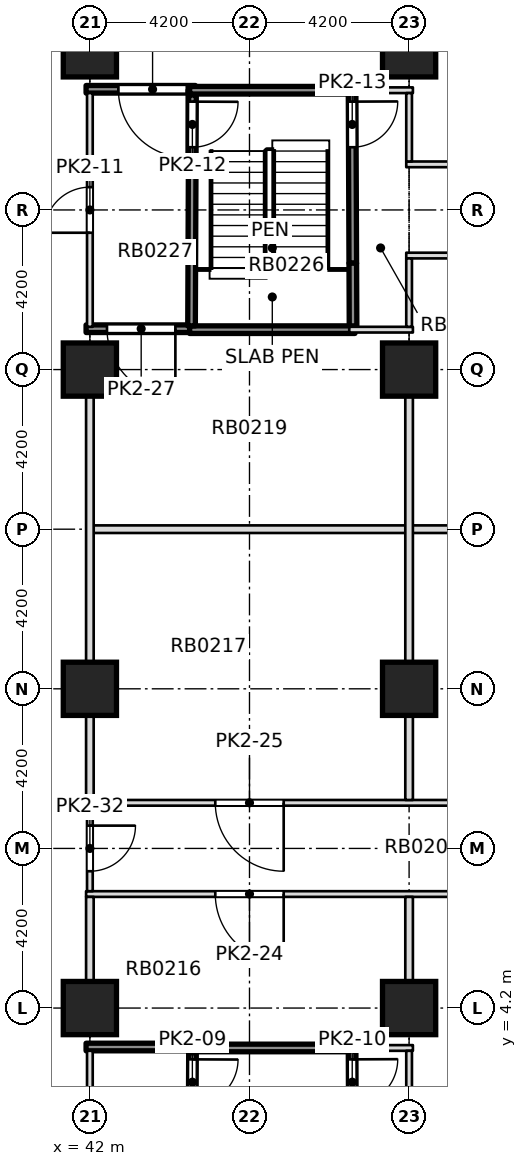
"""IFC4 building model, lengths in metres.
Left out: names, types, materials, properties, quantities, classifications, styles, units other than length and angle.
Written with IfcOpenShell. Run it as: python <this file> out.ifc"""

import sys

from ifc_helpers import new_model, si_unit, direction, frame, frame_2d, origin, origin_2d, place, context, subcontext, project, spatial, rectangle, extrude, element, fill, save


model = new_model("IFC4")
c1 = context("Model", 3, precision=1e-05, world=origin(), true_north=direction((0.0, 1.0)))
c2 = subcontext(c1, "Body", "Model", "MODEL_VIEW")
j1 = project(units=[si_unit("LENGTHUNIT", "METRE"), si_unit("PLANEANGLEUNIT", "RADIAN")], contexts=[c1])
p1 = place(None, origin())
s1 = spatial("IfcSite", under=j1, at=p1, CompositionType="ELEMENT")
p2 = place(p1, origin())
s2 = spatial("IfcBuilding", under=s1, at=p2, CompositionType="ELEMENT")
p3 = place(p2, frame((0.0, 0.0, -8.4)))
s3 = spatial("IfcBuildingStorey", under=s2, at=p3, CompositionType="ELEMENT", Elevation=-8.4)
for number, where, z_axis, x_axis in (
    (1, (42.0, 4.2, -0.5), (0.0, 0.0, 1.0), (1.0, 0.0, 0.0)),
    (2, (50.4, 4.2, -0.5), (0.0, 0.0, 1.0), (1.0, 0.0, 0.0)),
    (3, (42.0, 12.6, -0.5), (0.0, 0.0, 1.0), (1.0, 0.0, 0.0)),
    (4, (50.4, 12.6, -0.5), (0.0, 0.0, 1.0), (1.0, 0.0, 0.0)),
    (5, (42.0, 21.0, -0.5), (0.0, 0.0, 1.0), (1.0, 0.0, 0.0)),
    (6, (50.4, 21.0, -0.5), (0.0, 0.0, 1.0), (1.0, 0.0, 0.0)),
    (7, (42.0, 29.4, -0.5), (0.0, 0.0, 1.0), (1.0, 0.0, 0.0)),
    (8, (50.4, 29.4, -0.5), (0.0, 0.0, 1.0), (1.0, 0.0, 0.0)),
):
    element("IfcColumn", number, at=place(p3, frame(where, z_axis=z_axis, x_axis=x_axis)), inside=s3, PredefinedType="COLUMN", context=c2, shape_type="SweptSolid", body=[
        extrude(rectangle(XDim=1.4, YDim=1.4, at=origin_2d()), origin(), (0.0, 0.0, 1.0), 4.7),
    ])
p4 = place(p3, frame((41.9, 3.175, 0.0), z_axis=(0.0, 0.0, 1.0), x_axis=(1.0, 0.0, 0.0)))
e9 = element("IfcWall", 9, at=p4, inside=s3, PredefinedType="SOLIDWALL", context=c2, shape_type="SweptSolid", body=[
    extrude(rectangle(XDim=2.875, YDim=0.2, at=frame_2d((1.438, 0.0))), origin(), (0.0, 0.0, 1.0), 3.85),
])
p5 = place(p3, frame((44.625, 3.15, 0.0), z_axis=(0.0, 0.0, 1.0), x_axis=(1.0, 0.0, 0.0)))
e10 = element("IfcWall", 10, at=p5, inside=s3, PredefinedType="SOLIDWALL", context=c2, shape_type="SweptSolid", body=[
    extrude(rectangle(XDim=4.35, YDim=0.2, at=frame_2d((2.175, 0.0))), origin(), (0.0, 0.0, 1.0), 3.85),
])
p6 = place(p3, frame((48.825, 3.15, 0.0), z_axis=(0.0, 0.0, 1.0), x_axis=(1.0, 0.0, 0.0)))
e11 = element("IfcWall", 11, at=p6, inside=s3, PredefinedType="PARTITIONING", context=c2, shape_type="SweptSolid", body=[
    extrude(rectangle(XDim=1.675, YDim=0.15, at=frame_2d((0.837, 0.0))), origin(), (0.0, 0.0, 1.0), 3.85),
])
p7 = place(p3, frame((41.9, 7.2, 0.0), z_axis=(0.0, 0.0, 1.0), x_axis=(1.0, 0.0, 0.0)))
e12 = element("IfcWall", 12, at=p7, inside=s3, PredefinedType="PARTITIONING", context=c2, shape_type="SweptSolid", body=[
    extrude(rectangle(XDim=17.599, YDim=0.15, at=frame_2d((8.8, 0.0))), origin(), (0.0, 0.0, 1.0), 3.85),
])
p8 = place(p7, frame((12.05, 0.0, 0.0)))
e13 = element("IfcOpeningElement", 13, at=p8, cuts=e12, PredefinedType="OPENING", context=c2, shape_type="SweptSolid", body=[
    extrude(rectangle(XDim=1.8, YDim=2.1, at=frame_2d((0.9, 1.05))), frame((0.0, 0.085, 0.0), z_axis=(0.0, -1.0, 0.0), x_axis=(1.0, 0.0, 0.0)), (0.0, 0.0, 1.0), 0.17),
])
p9 = place(p7, frame((3.4, 0.0, 0.0)))
e14 = element("IfcOpeningElement", 14, at=p9, cuts=e12, PredefinedType="OPENING", context=c2, shape_type="SweptSolid", body=[
    extrude(rectangle(XDim=1.8, YDim=2.1, at=frame_2d((0.9, 1.05))), frame((0.0, 0.085, 0.0), z_axis=(0.0, -1.0, 0.0), x_axis=(1.0, 0.0, 0.0)), (0.0, 0.0, 1.0), 0.17),
])
p10 = place(p3, frame((41.9, 9.6, 0.0), z_axis=(0.0, 0.0, 1.0), x_axis=(1.0, 0.0, 0.0)))
e15 = element("IfcWall", 15, at=p10, inside=s3, PredefinedType="PARTITIONING", context=c2, shape_type="SweptSolid", body=[
    extrude(rectangle(XDim=17.599, YDim=0.15, at=frame_2d((8.8, 0.0))), origin(), (0.0, 0.0, 1.0), 3.85),
])
p11 = place(p10, frame((3.4, 0.0, 0.0)))
e16 = element("IfcOpeningElement", 16, at=p11, cuts=e15, PredefinedType="OPENING", context=c2, shape_type="SweptSolid", body=[
    extrude(rectangle(XDim=1.8, YDim=2.1, at=frame_2d((0.9, 1.05))), frame((0.0, 0.085, 0.0), z_axis=(0.0, -1.0, 0.0), x_axis=(1.0, 0.0, 0.0)), (0.0, 0.0, 1.0), 0.17),
])
p12 = place(p10, frame((12.05, 0.0, 0.0)))
e17 = element("IfcOpeningElement", 17, at=p12, cuts=e15, PredefinedType="OPENING", context=c2, shape_type="SweptSolid", body=[
    extrude(rectangle(XDim=1.8, YDim=2.1, at=frame_2d((0.9, 1.05))), frame((0.0, 0.085, 0.0), z_axis=(0.0, -1.0, 0.0), x_axis=(1.0, 0.0, 0.0)), (0.0, 0.0, 1.0), 0.17),
])
p13 = place(p3, frame((42.1, 16.8, 0.0), z_axis=(0.0, 0.0, 1.0), x_axis=(1.0, 0.0, 0.0)))
e18 = element("IfcWall", 18, at=p13, inside=s3, PredefinedType="PARTITIONING", context=c2, shape_type="SweptSolid", body=[
    extrude(rectangle(XDim=17.399, YDim=0.2, at=frame_2d((8.699, 0.0))), origin(), (0.0, 0.0, 1.0), 3.85),
])
p14 = place(p3, frame((41.9, 22.075, 0.0), z_axis=(0.0, 0.0, 1.0), x_axis=(1.0, 0.0, 0.0)))
e19 = element("IfcWall", 19, at=p14, inside=s3, PredefinedType="SOLIDWALL", context=c2, shape_type="SweptSolid", body=[
    extrude(rectangle(XDim=2.875, YDim=0.2, at=frame_2d((1.438, 0.0))), origin(), (0.0, 0.0, 1.0), 3.85),
])
p15 = place(p14, frame((0.55, 0.0, 0.0)))
e20 = element("IfcOpeningElement", 20, at=p15, cuts=e19, PredefinedType="OPENING", context=c2, shape_type="SweptSolid", body=[
    extrude(rectangle(XDim=1.8, YDim=2.1, at=frame_2d((0.9, 1.05))), frame((0.0, 0.11, 0.0), z_axis=(0.0, -1.0, 0.0), x_axis=(1.0, 0.0, 0.0)), (0.0, 0.0, 1.0), 0.22),
])
p16 = place(p3, frame((44.625, 22.05, 0.0), z_axis=(0.0, 0.0, 1.0), x_axis=(1.0, 0.0, 0.0)))
e21 = element("IfcWall", 21, at=p16, inside=s3, PredefinedType="SOLIDWALL", context=c2, shape_type="SweptSolid", body=[
    extrude(rectangle(XDim=4.35, YDim=0.2, at=frame_2d((2.175, 0.0))), origin(), (0.0, 0.0, 1.0), 3.85),
])
p17 = place(p3, frame((48.825, 22.05, 0.0), z_axis=(0.0, 0.0, 1.0), x_axis=(1.0, 0.0, 0.0)))
e22 = element("IfcWall", 22, at=p17, inside=s3, PredefinedType="PARTITIONING", context=c2, shape_type="SweptSolid", body=[
    extrude(rectangle(XDim=1.675, YDim=0.15, at=frame_2d((0.837, 0.0))), origin(), (0.0, 0.0, 1.0), 3.85),
])
p18 = place(p3, frame((50.325, 24.0, 0.0), z_axis=(0.0, 0.0, 1.0), x_axis=(1.0, 0.0, 0.0)))
e23 = element("IfcWall", 23, at=p18, inside=s3, PredefinedType="PARTITIONING", context=c2, shape_type="SweptSolid", body=[
    extrude(rectangle(XDim=9.174, YDim=0.15, at=frame_2d((4.587, 0.0))), origin(), (0.0, 0.0, 1.0), 3.85),
])
p19 = place(p18, frame((3.625, 0.0, 0.0)))
e24 = element("IfcOpeningElement", 24, at=p19, cuts=e23, PredefinedType="OPENING", context=c2, shape_type="SweptSolid", body=[
    extrude(rectangle(XDim=1.8, YDim=2.1, at=frame_2d((0.9, 1.05))), frame((0.0, 0.085, 0.0), z_axis=(0.0, -1.0, 0.0), x_axis=(1.0, 0.0, 0.0)), (0.0, 0.0, 1.0), 0.17),
])
p20 = place(p3, frame((50.325, 26.4, 0.0), z_axis=(0.0, 0.0, 1.0), x_axis=(1.0, 0.0, 0.0)))
e25 = element("IfcWall", 25, at=p20, inside=s3, PredefinedType="PARTITIONING", context=c2, shape_type="SweptSolid", body=[
    extrude(rectangle(XDim=9.174, YDim=0.15, at=frame_2d((4.587, 0.0))), origin(), (0.0, 0.0, 1.0), 3.85),
])
p21 = place(p20, frame((3.625, 0.0, 0.0)))
e26 = element("IfcOpeningElement", 26, at=p21, cuts=e25, PredefinedType="OPENING", context=c2, shape_type="SweptSolid", body=[
    extrude(rectangle(XDim=1.8, YDim=2.1, at=frame_2d((0.9, 1.05))), frame((0.0, 0.085, 0.0), z_axis=(0.0, -1.0, 0.0), x_axis=(1.0, 0.0, 0.0)), (0.0, 0.0, 1.0), 0.17),
])
p22 = place(p3, frame((41.9, 28.375, 0.0), z_axis=(0.0, 0.0, 1.0), x_axis=(1.0, 0.0, 0.0)))
e27 = element("IfcWall", 27, at=p22, inside=s3, PredefinedType="SOLIDWALL", context=c2, shape_type="SweptSolid", body=[
    extrude(rectangle(XDim=2.875, YDim=0.2, at=frame_2d((1.438, 0.0))), origin(), (0.0, 0.0, 1.0), 3.85),
])
p23 = place(p22, frame((0.85, 0.0, 0.0)))
e28 = element("IfcOpeningElement", 28, at=p23, cuts=e27, PredefinedType="OPENING", context=c2, shape_type="SweptSolid", body=[
    extrude(rectangle(XDim=1.8, YDim=2.1, at=frame_2d((0.9, 1.05))), frame((0.0, 0.11, 0.0), z_axis=(0.0, -1.0, 0.0), x_axis=(1.0, 0.0, 0.0)), (0.0, 0.0, 1.0), 0.22),
])
p24 = place(p3, frame((44.625, 28.35, 0.0), z_axis=(0.0, 0.0, 1.0), x_axis=(1.0, 0.0, 0.0)))
e29 = element("IfcWall", 29, at=p24, inside=s3, PredefinedType="SOLIDWALL", context=c2, shape_type="SweptSolid", body=[
    extrude(rectangle(XDim=4.35, YDim=0.2, at=frame_2d((2.175, 0.0))), origin(), (0.0, 0.0, 1.0), 3.85),
])
p25 = place(p3, frame((48.825, 28.35, 0.0), z_axis=(0.0, 0.0, 1.0), x_axis=(1.0, 0.0, 0.0)))
e30 = element("IfcWall", 30, at=p25, inside=s3, PredefinedType="PARTITIONING", context=c2, shape_type="SweptSolid", body=[
    extrude(rectangle(XDim=1.675, YDim=0.15, at=frame_2d((0.837, 0.0))), origin(), (0.0, 0.0, 1.0), 3.85),
])
p26 = place(p3, frame((42.0, -3.075, 0.0), z_axis=(0.0, 0.0, 1.0), x_axis=(0.0, 1.0, 0.0)))
e31 = element("IfcWall", 31, at=p26, inside=s3, PredefinedType="PARTITIONING", context=c2, shape_type="SweptSolid", body=[
    extrude(rectangle(XDim=6.15, YDim=0.15, at=frame_2d((3.075, 0.0))), origin(), (0.0, 0.0, 1.0), 3.85),
])
p27 = place(p26, frame((2.475, 0.0, 0.0)))
e32 = element("IfcOpeningElement", 32, at=p27, cuts=e31, PredefinedType="OPENING", context=c2, shape_type="SweptSolid", body=[
    extrude(rectangle(XDim=1.2, YDim=2.1, at=frame_2d((0.6, 1.05))), frame((0.0, 0.085, 0.0), z_axis=(0.0, -1.0, 0.0), x_axis=(1.0, 0.0, 0.0)), (0.0, 0.0, 1.0), 0.17),
])
p28 = place(p3, frame((42.0, 4.9, 0.0), z_axis=(0.0, 0.0, 1.0), x_axis=(0.0, 1.0, 0.0)))
e33 = element("IfcWall", 33, at=p28, inside=s3, PredefinedType="PARTITIONING", context=c2, shape_type="SweptSolid", body=[
    extrude(rectangle(XDim=2.225, YDim=0.2, at=frame_2d((1.113, 0.0))), origin(), (0.0, 0.0, 1.0), 3.85),
])
p29 = place(p3, frame((42.0, 7.275, 0.0), z_axis=(0.0, 0.0, 1.0), x_axis=(0.0, 1.0, 0.0)))
e34 = element("IfcWall", 34, at=p29, inside=s3, PredefinedType="PARTITIONING", context=c2, shape_type="SweptSolid", body=[
    extrude(rectangle(XDim=2.25, YDim=0.15, at=frame_2d((1.125, 0.0))), origin(), (0.0, 0.0, 1.0), 3.85),
])
p30 = place(p29, frame((0.525, 0.0, 0.0)))
e35 = element("IfcOpeningElement", 35, at=p30, cuts=e34, PredefinedType="OPENING", context=c2, shape_type="SweptSolid", body=[
    extrude(rectangle(XDim=1.2, YDim=2.1, at=frame_2d((0.6, 1.05))), frame((0.0, 0.085, 0.0), z_axis=(0.0, -1.0, 0.0), x_axis=(1.0, 0.0, 0.0)), (0.0, 0.0, 1.0), 0.17),
])
p31 = place(p3, frame((42.0, 9.675, 0.0), z_axis=(0.0, 0.0, 1.0), x_axis=(0.0, 1.0, 0.0)))
e36 = element("IfcWall", 36, at=p31, inside=s3, PredefinedType="PARTITIONING", context=c2, shape_type="SweptSolid", body=[
    extrude(rectangle(XDim=2.225, YDim=0.2, at=frame_2d((1.112, 0.0))), origin(), (0.0, 0.0, 1.0), 3.85),
])
p32 = place(p3, frame((42.0, 13.3, 0.0), z_axis=(0.0, 0.0, 1.0), x_axis=(0.0, 1.0, 0.0)))
e37 = element("IfcWall", 37, at=p32, inside=s3, PredefinedType="PARTITIONING", context=c2, shape_type="SweptSolid", body=[
    extrude(rectangle(XDim=7.0, YDim=0.2, at=frame_2d((3.5, 0.0))), origin(), (0.0, 0.0, 1.0), 3.85),
])
p33 = place(p3, frame((42.0, 22.125, 0.0), z_axis=(0.0, 0.0, 1.0), x_axis=(0.0, 1.0, 0.0)))
e38 = element("IfcWall", 38, at=p33, inside=s3, PredefinedType="PARTITIONING", context=c2, shape_type="SweptSolid", body=[
    extrude(rectangle(XDim=6.15, YDim=0.15, at=frame_2d((3.075, 0.0))), origin(), (0.0, 0.0, 1.0), 3.85),
])
p34 = place(p33, frame((2.475, 0.0, 0.0)))
e39 = element("IfcOpeningElement", 39, at=p34, cuts=e38, PredefinedType="OPENING", context=c2, shape_type="SweptSolid", body=[
    extrude(rectangle(XDim=1.2, YDim=2.1, at=frame_2d((0.6, 1.05))), frame((0.0, 0.085, 0.0), z_axis=(0.0, -1.0, 0.0), x_axis=(1.0, 0.0, 0.0)), (0.0, 0.0, 1.0), 0.17),
])
p35 = place(p3, frame((44.675, -3.05, 0.0), z_axis=(0.0, 0.0, 1.0), x_axis=(0.004098985015, 0.999991599126, 0.0)))
e40 = element("IfcWall", 40, at=p35, inside=s3, PredefinedType="SOLIDWALL", context=c2, shape_type="SweptSolid", body=[
    extrude(rectangle(XDim=6.075, YDim=0.2, at=frame_2d((3.038, 0.0))), origin(), (0.0, 0.0, 1.0), 3.85),
])
p36 = place(p35, frame((4.7, 0.0, 0.0)))
e41 = element("IfcOpeningElement", 41, at=p36, cuts=e40, PredefinedType="OPENING", context=c2, shape_type="SweptSolid", body=[
    extrude(rectangle(XDim=1.2, YDim=2.1, at=frame_2d((0.6, 1.05))), frame((0.0, 0.11, 0.0), z_axis=(0.0, -1.0, 0.0), x_axis=(1.0, 0.0, 0.0)), (0.0, 0.0, 1.0), 0.22),
])
p37 = place(p3, frame((44.675, 22.15, 0.0), z_axis=(0.0, 0.0, 1.0), x_axis=(0.004098985015, 0.999991599126, 0.0)))
e42 = element("IfcWall", 42, at=p37, inside=s3, PredefinedType="SOLIDWALL", context=c2, shape_type="SweptSolid", body=[
    extrude(rectangle(XDim=6.075, YDim=0.2, at=frame_2d((3.038, 0.0))), origin(), (0.0, 0.0, 1.0), 3.85),
])
p38 = place(p37, frame((4.7, 0.0, 0.0)))
e43 = element("IfcOpeningElement", 43, at=p38, cuts=e42, PredefinedType="OPENING", context=c2, shape_type="SweptSolid", body=[
    extrude(rectangle(XDim=1.2, YDim=2.1, at=frame_2d((0.6, 1.05))), frame((0.0, 0.11, 0.0), z_axis=(0.0, -1.0, 0.0), x_axis=(1.0, 0.0, 0.0)), (0.0, 0.0, 1.0), 0.22),
])
p39 = place(p3, frame((48.925, -3.05, 0.0), z_axis=(0.0, 0.0, 1.0), x_axis=(-0.004065655173, 0.99999173519, 0.0)))
e44 = element("IfcWall", 44, at=p39, inside=s3, PredefinedType="SOLIDWALL", context=c2, shape_type="SweptSolid", body=[
    extrude(rectangle(XDim=6.125, YDim=0.2, at=frame_2d((3.062, 0.0))), origin(), (0.0, 0.0, 1.0), 3.85),
])
p40 = place(p39, frame((4.7, 0.0, 0.0)))
e45 = element("IfcOpeningElement", 45, at=p40, cuts=e44, PredefinedType="OPENING", context=c2, shape_type="SweptSolid", body=[
    extrude(rectangle(XDim=1.2, YDim=2.1, at=frame_2d((0.6, 1.05))), frame((0.0, 0.11, 0.0), z_axis=(0.0, -1.0, 0.0), x_axis=(1.0, 0.0, 0.0)), (0.0, 0.0, 1.0), 0.22),
])
p41 = place(p3, frame((48.918, 23.8, 0.0), z_axis=(0.0, 0.0, 1.0), x_axis=(-0.004091618778, 0.999991629293, 0.0)))
e46 = element("IfcWall", 46, at=p41, inside=s3, PredefinedType="SOLIDWALL", context=c2, shape_type="SweptSolid", body=[
    extrude(rectangle(XDim=4.475, YDim=0.2, at=frame_2d((2.238, 0.0))), origin(), (0.0, 0.0, 1.0), 3.85),
])
p42 = place(p41, frame((3.05, 0.0, 0.0)))
e47 = element("IfcOpeningElement", 47, at=p42, cuts=e46, PredefinedType="OPENING", context=c2, shape_type="SweptSolid", body=[
    extrude(rectangle(XDim=1.2, YDim=2.1, at=frame_2d((0.6, 1.05))), frame((0.0, 0.11, 0.0), z_axis=(0.0, -1.0, 0.0), x_axis=(1.0, 0.0, 0.0)), (0.0, 0.0, 1.0), 0.22),
])
p43 = place(p3, frame((50.4, -3.075, 0.0), z_axis=(0.0, 0.0, 1.0), x_axis=(0.0, 1.0, 0.0)))
e48 = element("IfcWall", 48, at=p43, inside=s3, PredefinedType="PARTITIONING", context=c2, shape_type="SweptSolid", body=[
    extrude(rectangle(XDim=6.15, YDim=0.15, at=frame_2d((3.075, 0.0))), origin(), (0.0, 0.0, 1.0), 3.85),
])
p44 = place(p3, frame((50.4, 4.9, 0.0), z_axis=(0.0, 0.0, 1.0), x_axis=(0.0, 1.0, 0.0)))
e49 = element("IfcWall", 49, at=p44, inside=s3, PredefinedType="PARTITIONING", context=c2, shape_type="SweptSolid", body=[
    extrude(rectangle(XDim=2.225, YDim=0.2, at=frame_2d((1.113, 0.0))), origin(), (0.0, 0.0, 1.0), 3.85),
])
p45 = place(p3, frame((50.4, 9.675, 0.0), z_axis=(0.0, 0.0, 1.0), x_axis=(0.0, 1.0, 0.0)))
e50 = element("IfcWall", 50, at=p45, inside=s3, PredefinedType="PARTITIONING", context=c2, shape_type="SweptSolid", body=[
    extrude(rectangle(XDim=2.225, YDim=0.2, at=frame_2d((1.112, 0.0))), origin(), (0.0, 0.0, 1.0), 3.85),
])
p46 = place(p3, frame((50.4, 13.3, 0.0), z_axis=(0.0, 0.0, 1.0), x_axis=(0.0, 1.0, 0.0)))
e51 = element("IfcWall", 51, at=p46, inside=s3, PredefinedType="PARTITIONING", context=c2, shape_type="SweptSolid", body=[
    extrude(rectangle(XDim=7.0, YDim=0.2, at=frame_2d((3.5, 0.0))), origin(), (0.0, 0.0, 1.0), 3.85),
])
p47 = place(p3, frame((50.4, 22.125, 0.0), z_axis=(0.0, 0.0, 1.0), x_axis=(0.0, 1.0, 0.0)))
e52 = element("IfcWall", 52, at=p47, inside=s3, PredefinedType="PARTITIONING", context=c2, shape_type="SweptSolid", body=[
    extrude(rectangle(XDim=1.8, YDim=0.15, at=frame_2d((0.9, 0.0))), origin(), (0.0, 0.0, 1.0), 3.85),
])
p48 = place(p3, frame((50.4, 26.475, 0.0), z_axis=(0.0, 0.0, 1.0), x_axis=(0.0, 1.0, 0.0)))
e53 = element("IfcWall", 53, at=p48, inside=s3, PredefinedType="PARTITIONING", context=c2, shape_type="SweptSolid", body=[
    extrude(rectangle(XDim=1.8, YDim=0.15, at=frame_2d((0.9, 0.0))), origin(), (0.0, 0.0, 1.0), 3.85),
])
p49 = place(p3, frame((48.925, 22.15, 0.0), z_axis=(0.0, 0.0, 1.0), x_axis=(-0.003995232985, 0.999992019025, 0.0)))
e54 = element("IfcWall", 54, at=p49, inside=s3, PredefinedType="SOLIDWALL", context=c2, shape_type="SweptSolid", body=[
    extrude(rectangle(XDim=1.65, YDim=0.2, at=frame_2d((0.825, 0.0))), origin(), (0.0, 0.0, 1.0), 3.85),
])
p50 = place(p36, origin())
e55 = element("IfcDoor", 55, at=p50, inside=s3, OperationType="DOUBLE_DOOR_SINGLE_SWING", PredefinedType="DOOR", context=c2, shape_type="SweptSolid", body=[
    extrude(rectangle(XDim=1.2, YDim=2.1, at=frame_2d((0.6, 1.05))), frame((0.0, 0.025, 0.0), z_axis=(0.0, -1.0, 0.0), x_axis=(1.0, 0.0, 0.0)), (0.0, 0.0, 1.0), 0.05),
])
fill(e41, e55)
p51 = place(p40, origin())
e56 = element("IfcDoor", 56, at=p51, inside=s3, OperationType="DOUBLE_DOOR_SINGLE_SWING", PredefinedType="DOOR", context=c2, shape_type="SweptSolid", body=[
    extrude(rectangle(XDim=1.2, YDim=2.1, at=frame_2d((0.6, 1.05))), frame((0.0, 0.025, 0.0), z_axis=(0.0, -1.0, 0.0), x_axis=(1.0, 0.0, 0.0)), (0.0, 0.0, 1.0), 0.05),
])
fill(e45, e56)
p52 = place(p34, origin())
e57 = element("IfcDoor", 57, at=p52, inside=s3, OperationType="DOUBLE_DOOR_SINGLE_SWING", PredefinedType="DOOR", context=c2, shape_type="SweptSolid", body=[
    extrude(rectangle(XDim=1.2, YDim=2.1, at=frame_2d((0.6, 1.05))), frame((0.0, 0.025, 0.0), z_axis=(0.0, -1.0, 0.0), x_axis=(1.0, 0.0, 0.0)), (0.0, 0.0, 1.0), 0.05),
])
fill(e39, e57)
p53 = place(p38, origin())
e58 = element("IfcDoor", 58, at=p53, inside=s3, OperationType="DOUBLE_DOOR_SINGLE_SWING", PredefinedType="DOOR", context=c2, shape_type="SweptSolid", body=[
    extrude(rectangle(XDim=1.2, YDim=2.1, at=frame_2d((0.6, 1.05))), frame((0.0, 0.025, 0.0), z_axis=(0.0, -1.0, 0.0), x_axis=(1.0, 0.0, 0.0)), (0.0, 0.0, 1.0), 0.05),
])
fill(e43, e58)
p54 = place(p42, origin())
e59 = element("IfcDoor", 59, at=p54, inside=s3, OperationType="DOUBLE_DOOR_SINGLE_SWING", PredefinedType="DOOR", context=c2, shape_type="SweptSolid", body=[
    extrude(rectangle(XDim=1.2, YDim=2.1, at=frame_2d((0.6, 1.05))), frame((0.0, 0.025, 0.0), z_axis=(0.0, -1.0, 0.0), x_axis=(1.0, 0.0, 0.0)), (0.0, 0.0, 1.0), 0.05),
])
fill(e47, e59)
p55 = place(p9, origin())
e60 = element("IfcDoor", 60, at=p55, inside=s3, OperationType="DOUBLE_DOOR_SINGLE_SWING", PredefinedType="DOOR", context=c2, shape_type="SweptSolid", body=[
    extrude(rectangle(XDim=1.8, YDim=2.1, at=frame_2d((0.9, 1.05))), frame((0.0, 0.025, 0.0), z_axis=(0.0, -1.0, 0.0), x_axis=(1.0, 0.0, 0.0)), (0.0, 0.0, 1.0), 0.05),
])
fill(e14, e60)
p56 = place(p11, origin())
e61 = element("IfcDoor", 61, at=p56, inside=s3, OperationType="DOUBLE_DOOR_SINGLE_SWING", PredefinedType="DOOR", context=c2, shape_type="SweptSolid", body=[
    extrude(rectangle(XDim=1.8, YDim=2.1, at=frame_2d((0.9, 1.05))), frame((0.0, 0.025, 0.0), z_axis=(0.0, -1.0, 0.0), x_axis=(1.0, 0.0, 0.0)), (0.0, 0.0, 1.0), 0.05),
])
fill(e16, e61)
p57 = place(p15, origin())
e62 = element("IfcDoor", 62, at=p57, inside=s3, OperationType="DOUBLE_DOOR_SINGLE_SWING", PredefinedType="DOOR", context=c2, shape_type="SweptSolid", body=[
    extrude(rectangle(XDim=1.8, YDim=2.1, at=frame_2d((0.9, 1.05))), frame((0.0, 0.025, 0.0), z_axis=(0.0, -1.0, 0.0), x_axis=(1.0, 0.0, 0.0)), (0.0, 0.0, 1.0), 0.05),
])
fill(e20, e62)
p58 = place(p23, origin())
e63 = element("IfcDoor", 63, at=p58, inside=s3, OperationType="DOUBLE_DOOR_SINGLE_SWING", PredefinedType="DOOR", context=c2, shape_type="SweptSolid", body=[
    extrude(rectangle(XDim=1.8, YDim=2.1, at=frame_2d((0.9, 1.05))), frame((0.0, 0.025, 0.0), z_axis=(0.0, -1.0, 0.0), x_axis=(1.0, 0.0, 0.0)), (0.0, 0.0, 1.0), 0.05),
])
fill(e28, e63)
p59 = place(p30, origin())
e64 = element("IfcDoor", 64, at=p59, inside=s3, OperationType="SINGLE_SWING_LEFT", PredefinedType="DOOR", context=c2, shape_type="SweptSolid", body=[
    extrude(rectangle(XDim=1.2, YDim=2.1, at=frame_2d((0.6, 1.05))), frame((0.0, 0.025, 0.0), z_axis=(0.0, -1.0, 0.0), x_axis=(1.0, 0.0, 0.0)), (0.0, 0.0, 1.0), 0.05),
])
fill(e35, e64)
save(model, sys.argv[1])
